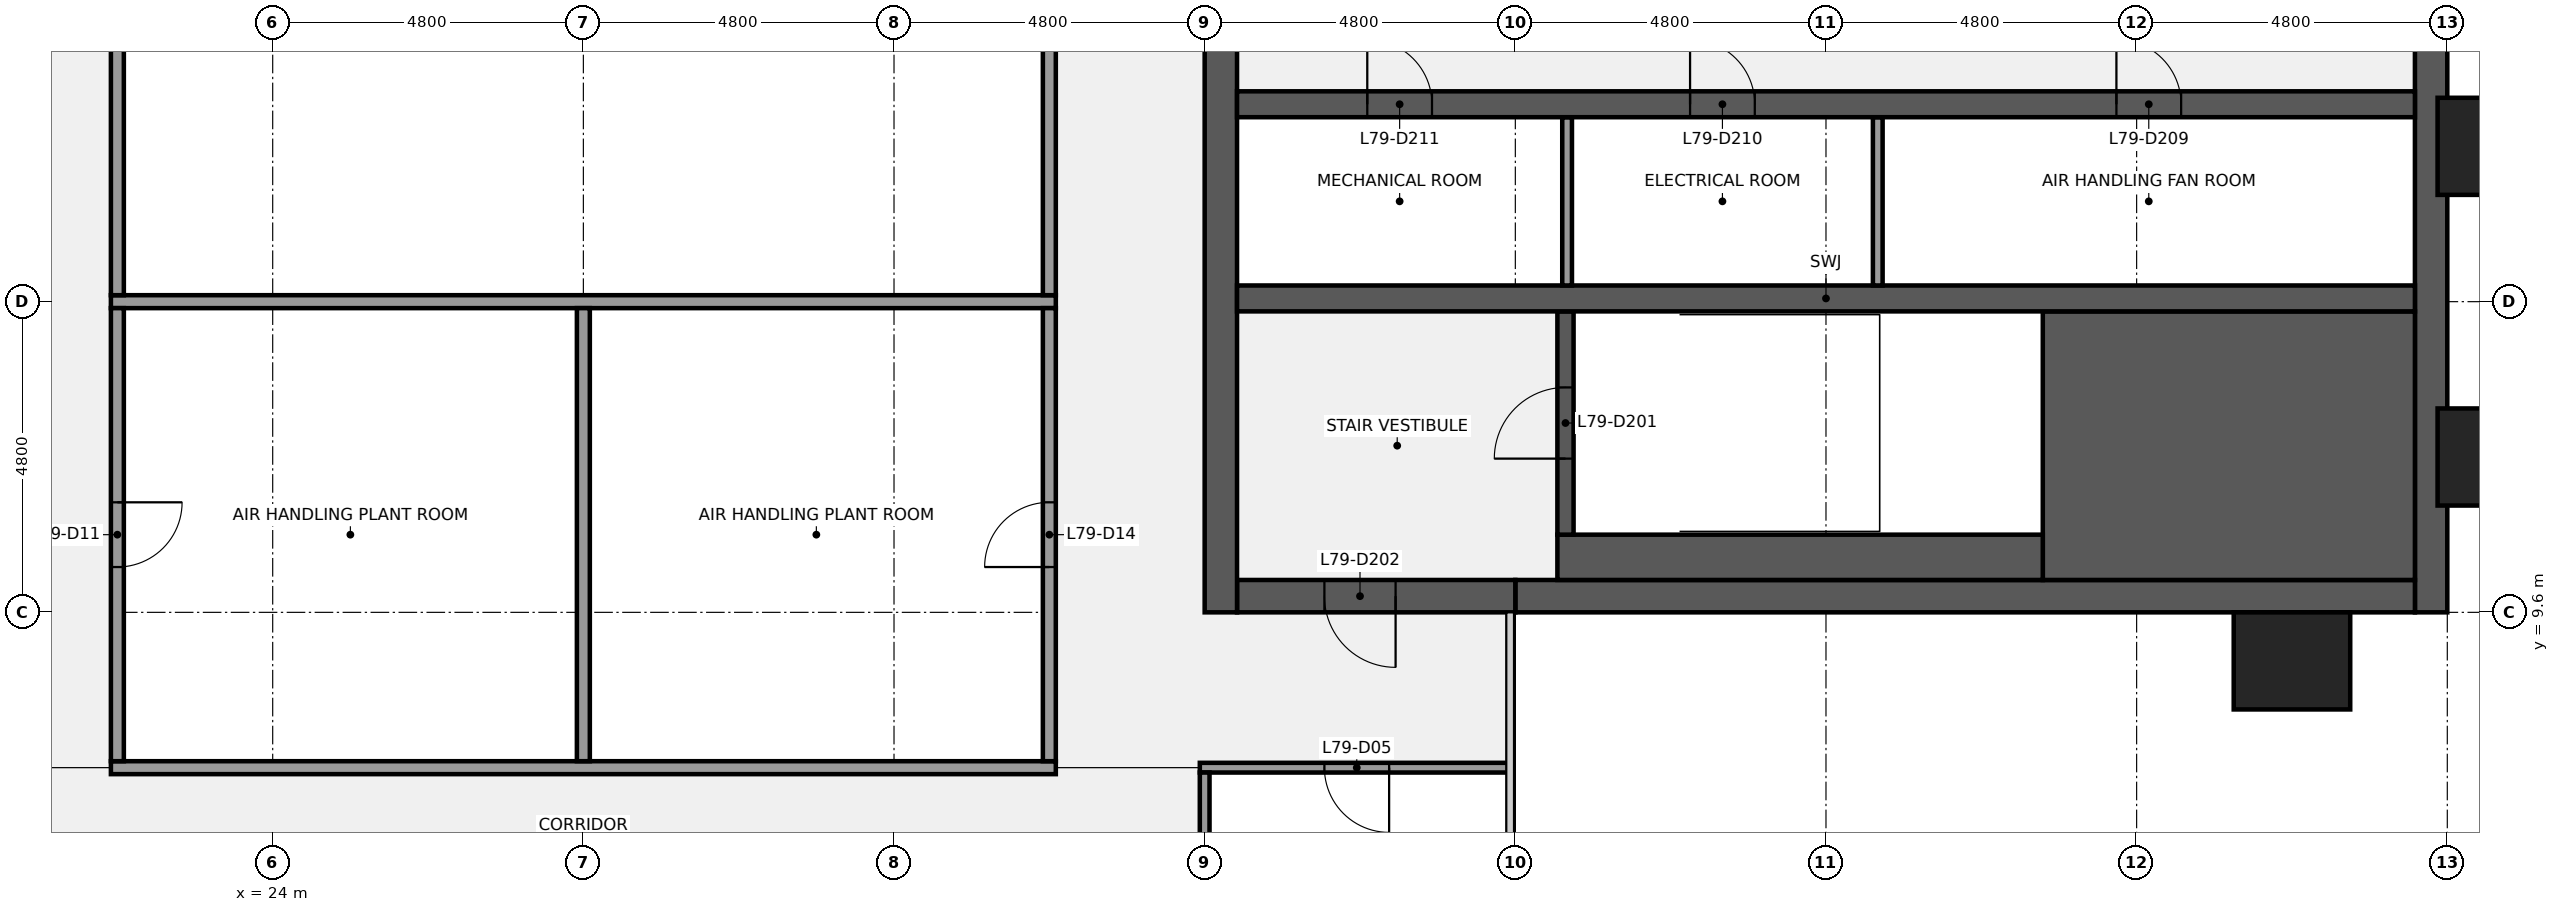
"""IFC4 building model, lengths in metres.
Left out: names, types, materials, properties, quantities, classifications, styles, units other than length and angle.
Written with IfcOpenShell. Run it as: python <this file> out.ifc"""

import sys

from ifc_helpers import new_model, si_unit, direction, frame, frame_2d, origin, origin_2d, place, context, subcontext, project, spatial, rectangle, extrude, element, fill, save


model = new_model("IFC4")
c1 = context("Model", 3, precision=1e-05, world=origin(), true_north=direction((0.0, 1.0)))
c2 = subcontext(c1, "Body", "Model", "MODEL_VIEW")
j1 = project(units=[si_unit("LENGTHUNIT", "METRE"), si_unit("PLANEANGLEUNIT", "RADIAN")], contexts=[c1])
p1 = place(None, origin())
s1 = spatial("IfcSite", under=j1, at=p1, CompositionType="ELEMENT")
p2 = place(p1, origin())
s2 = spatial("IfcBuilding", under=s1, at=p2, CompositionType="ELEMENT")
p3 = place(p2, frame((0.0, 0.0, 354.3)))
s3 = spatial("IfcBuildingStorey", under=s2, at=p3, CompositionType="ELEMENT", Elevation=354.3)
p4 = place(p3, frame((57.35, 38.4, 0.0), z_axis=(0.0, 0.0, 1.0), x_axis=(0.0, -1.0, 0.0)))
e1 = element("IfcWall", 1, at=p4, inside=s3, PredefinedType="SHEAR", context=c2, shape_type="SweptSolid", body=[
    extrude(rectangle(XDim=28.8, YDim=0.5, at=frame_2d((14.4, 0.0))), origin(), (0.0, 0.0, 1.0), 3.75),
])
p5 = place(p3, frame((57.1, 9.85, 0.0), z_axis=(0.0, 0.0, 1.0), x_axis=(-1.0, 0.0, 0.0)))
e2 = element("IfcWall", 2, at=p5, inside=s3, PredefinedType="SHEAR", context=c2, shape_type="SweptSolid", body=[
    extrude(rectangle(XDim=13.9, YDim=0.5, at=frame_2d((6.95, 0.0))), origin(), (0.0, 0.0, 1.0), 3.75),
])
p6 = place(p3, frame((43.2, 9.85, 0.0), z_axis=(0.0, 0.0, 1.0), x_axis=(-1.0, 0.0, 0.0)))
e3 = element("IfcWall", 3, at=p6, inside=s3, PredefinedType="SHEAR", context=c2, shape_type="SweptSolid", body=[
    extrude(rectangle(XDim=4.3, YDim=0.5, at=frame_2d((2.15, 0.0))), origin(), (0.0, 0.0, 1.0), 3.75),
])
p7 = place(p6, frame((1.85, 0.0, 0.0)))
e4 = element("IfcOpeningElement", 4, at=p7, cuts=e3, PredefinedType="OPENING", context=c2, shape_type="SweptSolid", body=[
    extrude(rectangle(XDim=1.1, YDim=2.1, at=frame_2d((0.55, 1.05))), frame((0.0, 0.26, 0.0), z_axis=(0.0, -1.0, 0.0), x_axis=(1.0, 0.0, 0.0)), (0.0, 0.0, 1.0), 0.52),
])
p8 = place(p3, frame((38.65, 9.6, 0.0), z_axis=(0.0, 0.0, 1.0), x_axis=(0.0, 1.0, 0.0)))
e5 = element("IfcWall", 5, at=p8, inside=s3, PredefinedType="SHEAR", context=c2, shape_type="SweptSolid", body=[
    extrude(rectangle(XDim=28.8, YDim=0.5, at=frame_2d((14.4, 0.0))), origin(), (0.0, 0.0, 1.0), 3.75),
])
p9 = place(p8, frame((8.7, 0.0, 0.0)))
e6 = element("IfcOpeningElement", 6, at=p9, cuts=e5, PredefinedType="OPENING", context=c2, shape_type="SweptSolid", body=[
    extrude(rectangle(XDim=1.8, YDim=2.1, at=frame_2d((0.9, 1.05))), frame((0.0, 0.26, 0.0), z_axis=(0.0, -1.0, 0.0), x_axis=(1.0, 0.0, 0.0)), (0.0, 0.0, 1.0), 0.52),
])
p10 = place(p8, frame((18.3, 0.0, 0.0)))
e7 = element("IfcOpeningElement", 7, at=p10, cuts=e5, PredefinedType="OPENING", context=c2, shape_type="SweptSolid", body=[
    extrude(rectangle(XDim=1.8, YDim=2.1, at=frame_2d((0.9, 1.05))), frame((0.0, 0.26, 0.0), z_axis=(0.0, -1.0, 0.0), x_axis=(1.0, 0.0, 0.0)), (0.0, 0.0, 1.0), 0.52),
])
p11 = place(p3, frame((51.35, 12.175, 0.0), z_axis=(0.0, 0.0, 1.0), x_axis=(1.0, 0.0, 0.0)))
e8 = element("IfcWall", 8, at=p11, inside=s3, PredefinedType="SHEAR", context=c2, shape_type="SweptSolid", body=[
    extrude(rectangle(XDim=5.75, YDim=4.15, at=frame_2d((2.875, 0.0))), origin(), (0.0, 0.0, 1.0), 3.75),
])
p12 = place(p3, frame((43.85, 10.45, 0.0), z_axis=(0.0, 0.0, 1.0), x_axis=(1.0, 0.0, 0.0)))
e9 = element("IfcWall", 9, at=p12, inside=s3, PredefinedType="SHEAR", context=c2, shape_type="SweptSolid", body=[
    extrude(rectangle(XDim=7.5, YDim=0.7, at=frame_2d((3.75, 0.0))), origin(), (0.0, 0.0, 1.0), 3.75),
])
p13 = place(p3, frame((43.975, 10.8, 0.0), z_axis=(0.0, 0.0, 1.0), x_axis=(0.0, 1.0, 0.0)))
e10 = element("IfcWall", 10, at=p13, inside=s3, PredefinedType="SHEAR", context=c2, shape_type="SweptSolid", body=[
    extrude(rectangle(XDim=3.45, YDim=0.25, at=frame_2d((1.725, 0.0))), origin(), (0.0, 0.0, 1.0), 3.75),
])
p14 = place(p13, frame((1.175, 0.0, 0.0)))
e11 = element("IfcOpeningElement", 11, at=p14, cuts=e10, PredefinedType="OPENING", context=c2, shape_type="SweptSolid", body=[
    extrude(rectangle(XDim=1.1, YDim=2.1, at=frame_2d((0.55, 1.05))), frame((0.0, 0.135, 0.0), z_axis=(0.0, -1.0, 0.0), x_axis=(1.0, 0.0, 0.0)), (0.0, 0.0, 1.0), 0.27),
])
p15 = place(p3, frame((38.9, 14.45, 0.0), z_axis=(0.0, 0.0, 1.0), x_axis=(1.0, 0.0, 0.0)))
e12 = element("IfcWall", 12, at=p15, inside=s3, PredefinedType="SHEAR", context=c2, shape_type="SweptSolid", body=[
    extrude(rectangle(XDim=18.2, YDim=0.4, at=frame_2d((9.1, 0.0))), origin(), (0.0, 0.0, 1.0), 3.75),
])
for number, where, z_axis, x_axis in (
    (13, (48.8, 14.65, 0.0), (0.0, 0.0, 1.0), (0.0, 1.0, 0.0)),
    (14, (44.0, 14.65, 0.0), (0.0, 0.0, 1.0), (0.0, 1.0, 0.0)),
):
    element("IfcWall", number, at=place(p3, frame(where, z_axis=z_axis, x_axis=x_axis)), inside=s3, PredefinedType="PARTITIONING", context=c2, shape_type="SweptSolid", body=[
        extrude(rectangle(XDim=2.6, YDim=0.15, at=frame_2d((1.3, 0.0))), origin(), (0.0, 0.0, 1.0), 3.75),
    ])
p16 = place(p3, frame((38.9, 17.45, 0.0), z_axis=(0.0, 0.0, 1.0), x_axis=(1.0, 0.0, 0.0)))
e15 = element("IfcWall", 15, at=p16, inside=s3, PredefinedType="SHEAR", context=c2, shape_type="SweptSolid", body=[
    extrude(rectangle(XDim=18.2, YDim=0.4, at=frame_2d((9.1, 0.0))), origin(), (0.0, 0.0, 1.0), 3.75),
])
p17 = place(p16, frame((13.587, 0.0, 0.0)))
e16 = element("IfcOpeningElement", 16, at=p17, cuts=e15, PredefinedType="OPENING", context=c2, shape_type="SweptSolid", body=[
    extrude(rectangle(XDim=1.0, YDim=2.1, at=frame_2d((0.5, 1.05))), frame((0.0, 0.21, 0.0), z_axis=(0.0, -1.0, 0.0), x_axis=(1.0, 0.0, 0.0)), (0.0, 0.0, 1.0), 0.42),
])
p18 = place(p16, frame((7.0, 0.0, 0.0)))
e17 = element("IfcOpeningElement", 17, at=p18, cuts=e15, PredefinedType="OPENING", context=c2, shape_type="SweptSolid", body=[
    extrude(rectangle(XDim=1.0, YDim=2.1, at=frame_2d((0.5, 1.05))), frame((0.0, 0.21, 0.0), z_axis=(0.0, -1.0, 0.0), x_axis=(1.0, 0.0, 0.0)), (0.0, 0.0, 1.0), 0.42),
])
p19 = place(p16, frame((2.012, 0.0, 0.0)))
e18 = element("IfcOpeningElement", 18, at=p19, cuts=e15, PredefinedType="OPENING", context=c2, shape_type="SweptSolid", body=[
    extrude(rectangle(XDim=1.0, YDim=2.1, at=frame_2d((0.5, 1.05))), frame((0.0, 0.21, 0.0), z_axis=(0.0, -1.0, 0.0), x_axis=(1.0, 0.0, 0.0)), (0.0, 0.0, 1.0), 0.42),
])
p20 = place(p3, frame((38.325, 7.2, 0.0), z_axis=(0.0, 0.0, 1.0), x_axis=(1.0, 0.0, 0.0)))
e19 = element("IfcWall", 19, at=p20, inside=s3, PredefinedType="PARTITIONING", context=c2, shape_type="SweptSolid", body=[
    extrude(rectangle(XDim=4.775, YDim=0.15, at=frame_2d((2.388, 0.0))), origin(), (0.0, 0.0, 1.0), 2.759),
])
p21 = place(p20, frame((1.925, 0.0, 0.0)))
e20 = element("IfcOpeningElement", 20, at=p21, cuts=e19, PredefinedType="OPENING", context=c2, shape_type="SweptSolid", body=[
    extrude(rectangle(XDim=1.0, YDim=2.1, at=frame_2d((0.5, 1.05))), frame((0.0, 0.085, 0.0), z_axis=(0.0, -1.0, 0.0), x_axis=(1.0, 0.0, 0.0)), (0.0, 0.0, 1.0), 0.17),
])
for number, where, z_axis, x_axis in (
    (21, (21.5, 7.2, 0.0), (0.0, 0.0, 1.0), (1.0, 0.0, 0.0)),
    (22, (21.5, 14.4, 0.0), (0.0, 0.0, 1.0), (1.0, 0.0, 0.0)),
):
    element("IfcWall", number, at=place(p3, frame(where, z_axis=z_axis, x_axis=x_axis)), inside=s3, PredefinedType="PARTITIONING", context=c2, shape_type="SweptSolid", body=[
        extrude(rectangle(XDim=14.6, YDim=0.2, at=frame_2d((7.3, 0.0))), origin(), (0.0, 0.0, 1.0), 2.759),
    ])
p22 = place(p3, frame((21.6, 7.3, 0.0), z_axis=(0.0, 0.0, 1.0), x_axis=(0.0, 1.0, 0.0)))
e23 = element("IfcWall", 23, at=p22, inside=s3, PredefinedType="PARTITIONING", context=c2, shape_type="SweptSolid", body=[
    extrude(rectangle(XDim=7.0, YDim=0.2, at=frame_2d((3.5, 0.0))), origin(), (0.0, 0.0, 1.0), 2.759),
])
p23 = place(p22, frame((3.0, 0.0, 0.0)))
e24 = element("IfcOpeningElement", 24, at=p23, cuts=e23, PredefinedType="OPENING", context=c2, shape_type="SweptSolid", body=[
    extrude(rectangle(XDim=1.0, YDim=2.1, at=frame_2d((0.5, 1.05))), frame((0.0, 0.11, 0.0), z_axis=(0.0, -1.0, 0.0), x_axis=(1.0, 0.0, 0.0)), (0.0, 0.0, 1.0), 0.22),
])
p24 = place(p3, frame((21.6, 14.5, 0.0), z_axis=(0.0, 0.0, 1.0), x_axis=(0.0, 1.0, 0.0)))
e25 = element("IfcWall", 25, at=p24, inside=s3, PredefinedType="PARTITIONING", context=c2, shape_type="SweptSolid", body=[
    extrude(rectangle(XDim=9.4, YDim=0.2, at=frame_2d((4.7, 0.0))), origin(), (0.0, 0.0, 1.0), 2.759),
])
p25 = place(p24, frame((4.2, 0.0, 0.0)))
e26 = element("IfcOpeningElement", 26, at=p25, cuts=e25, PredefinedType="OPENING", context=c2, shape_type="SweptSolid", body=[
    extrude(rectangle(XDim=1.0, YDim=2.1, at=frame_2d((0.5, 1.05))), frame((0.0, 0.11, 0.0), z_axis=(0.0, -1.0, 0.0), x_axis=(1.0, 0.0, 0.0)), (0.0, 0.0, 1.0), 0.22),
])
p26 = place(p3, frame((28.8, 7.3, 0.0), z_axis=(0.0, 0.0, 1.0), x_axis=(0.0, 1.0, 0.0)))
e27 = element("IfcWall", 27, at=p26, inside=s3, PredefinedType="PARTITIONING", context=c2, shape_type="SweptSolid", body=[
    extrude(rectangle(XDim=7.0, YDim=0.2, at=frame_2d((3.5, 0.0))), origin(), (0.0, 0.0, 1.0), 2.759),
])
p27 = place(p3, frame((36.0, 7.3, 0.0), z_axis=(0.0, 0.0, 1.0), x_axis=(0.0, 1.0, 0.0)))
e28 = element("IfcWall", 28, at=p27, inside=s3, PredefinedType="PARTITIONING", context=c2, shape_type="SweptSolid", body=[
    extrude(rectangle(XDim=7.0, YDim=0.2, at=frame_2d((3.5, 0.0))), origin(), (0.0, 0.0, 1.0), 2.759),
])
p28 = place(p27, frame((3.0, 0.0, 0.0)))
e29 = element("IfcOpeningElement", 29, at=p28, cuts=e28, PredefinedType="OPENING", context=c2, shape_type="SweptSolid", body=[
    extrude(rectangle(XDim=1.0, YDim=2.1, at=frame_2d((0.5, 1.05))), frame((0.0, 0.11, 0.0), z_axis=(0.0, -1.0, 0.0), x_axis=(1.0, 0.0, 0.0)), (0.0, 0.0, 1.0), 0.22),
])
p29 = place(p3, frame((36.0, 14.5, 0.0), z_axis=(0.0, 0.0, 1.0), x_axis=(0.0, 1.0, 0.0)))
e30 = element("IfcWall", 30, at=p29, inside=s3, PredefinedType="PARTITIONING", context=c2, shape_type="SweptSolid", body=[
    extrude(rectangle(XDim=9.4, YDim=0.2, at=frame_2d((4.7, 0.0))), origin(), (0.0, 0.0, 1.0), 2.759),
])
p30 = place(p3, frame((38.4, 4.9, 0.0), z_axis=(0.0, 0.0, 1.0), x_axis=(0.0, 1.0, 0.0)))
e31 = element("IfcWall", 31, at=p30, inside=s3, PredefinedType="PARTITIONING", context=c2, shape_type="SweptSolid", body=[
    extrude(rectangle(XDim=2.225, YDim=0.15, at=frame_2d((1.113, 0.0))), origin(), (0.0, 0.0, 1.0), 2.759),
])
for number, where, z_axis, x_axis in (
    (32, (55.2, 8.85, 0.0), (0.0, 0.0, 1.0), (1.0, 0.0, 0.0)),
    (33, (58.35, 12.0, 0.0), (0.0, 0.0, 1.0), (0.0, 1.0, 0.0)),
    (34, (58.35, 16.8, 0.0), (0.0, 0.0, 1.0), (0.0, 1.0, 0.0)),
):
    element("IfcColumn", number, at=place(p3, frame(where, z_axis=z_axis, x_axis=x_axis)), inside=s3, PredefinedType="PILASTER", context=c2, shape_type="SweptSolid", body=[
        extrude(rectangle(XDim=1.8, YDim=1.5, at=origin_2d()), origin(), (0.0, 0.0, 1.0), 4.0),
    ])
p31 = place(p14, origin())
e35 = element("IfcDoor", 35, at=p31, inside=s3, OperationType="SINGLE_SWING_LEFT", PredefinedType="DOOR", context=c2, shape_type="SweptSolid", body=[
    extrude(rectangle(XDim=1.1, YDim=2.1, at=frame_2d((0.55, 1.05))), frame((0.0, 0.025, 0.0), z_axis=(0.0, -1.0, 0.0), x_axis=(1.0, 0.0, 0.0)), (0.0, 0.0, 1.0), 0.05),
])
fill(e11, e35)
p32 = place(p7, origin())
e36 = element("IfcDoor", 36, at=p32, inside=s3, OperationType="SINGLE_SWING_LEFT", PredefinedType="DOOR", context=c2, shape_type="SweptSolid", body=[
    extrude(rectangle(XDim=1.1, YDim=2.1, at=frame_2d((0.55, 1.05))), frame((0.0, 0.025, 0.0), z_axis=(0.0, -1.0, 0.0), x_axis=(1.0, 0.0, 0.0)), (0.0, 0.0, 1.0), 0.05),
])
fill(e4, e36)
p33 = place(p17, origin())
e37 = element("IfcDoor", 37, at=p33, inside=s3, OperationType="SINGLE_SWING_LEFT", PredefinedType="DOOR", context=c2, shape_type="SweptSolid", body=[
    extrude(rectangle(XDim=1.0, YDim=2.1, at=frame_2d((0.5, 1.05))), frame((0.0, 0.025, 0.0), z_axis=(0.0, -1.0, 0.0), x_axis=(1.0, 0.0, 0.0)), (0.0, 0.0, 1.0), 0.05),
])
fill(e16, e37)
p34 = place(p18, origin())
e38 = element("IfcDoor", 38, at=p34, inside=s3, OperationType="SINGLE_SWING_LEFT", PredefinedType="DOOR", context=c2, shape_type="SweptSolid", body=[
    extrude(rectangle(XDim=1.0, YDim=2.1, at=frame_2d((0.5, 1.05))), frame((0.0, 0.025, 0.0), z_axis=(0.0, -1.0, 0.0), x_axis=(1.0, 0.0, 0.0)), (0.0, 0.0, 1.0), 0.05),
])
fill(e17, e38)
p35 = place(p19, origin())
e39 = element("IfcDoor", 39, at=p35, inside=s3, OperationType="SINGLE_SWING_LEFT", PredefinedType="DOOR", context=c2, shape_type="SweptSolid", body=[
    extrude(rectangle(XDim=1.0, YDim=2.1, at=frame_2d((0.5, 1.05))), frame((0.0, 0.025, 0.0), z_axis=(0.0, -1.0, 0.0), x_axis=(1.0, 0.0, 0.0)), (0.0, 0.0, 1.0), 0.05),
])
fill(e18, e39)
p36 = place(p21, origin())
e40 = element("IfcDoor", 40, at=p36, inside=s3, OperationType="SINGLE_SWING_RIGHT", PredefinedType="DOOR", context=c2, shape_type="SweptSolid", body=[
    extrude(rectangle(XDim=1.0, YDim=2.1, at=frame_2d((0.5, 1.05))), frame((0.0, 0.025, 0.0), z_axis=(0.0, -1.0, 0.0), x_axis=(1.0, 0.0, 0.0)), (0.0, 0.0, 1.0), 0.05),
])
fill(e20, e40)
p37 = place(p23, origin())
e41 = element("IfcDoor", 41, at=p37, inside=s3, OperationType="SINGLE_SWING_RIGHT", PredefinedType="DOOR", context=c2, shape_type="SweptSolid", body=[
    extrude(rectangle(XDim=1.0, YDim=2.1, at=frame_2d((0.5, 1.05))), frame((0.0, 0.025, 0.0), z_axis=(0.0, -1.0, 0.0), x_axis=(1.0, 0.0, 0.0)), (0.0, 0.0, 1.0), 0.05),
])
fill(e24, e41)
p38 = place(p28, origin())
e42 = element("IfcDoor", 42, at=p38, inside=s3, OperationType="SINGLE_SWING_LEFT", PredefinedType="DOOR", context=c2, shape_type="SweptSolid", body=[
    extrude(rectangle(XDim=1.0, YDim=2.1, at=frame_2d((0.5, 1.05))), frame((0.0, 0.025, 0.0), z_axis=(0.0, -1.0, 0.0), x_axis=(1.0, 0.0, 0.0)), (0.0, 0.0, 1.0), 0.05),
])
fill(e29, e42)
save(model, sys.argv[1])
